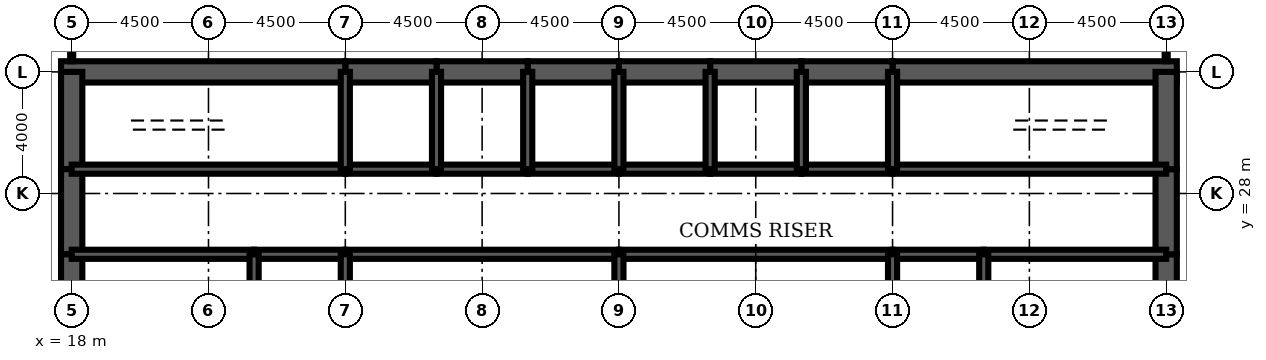
"""IFC4 building model, lengths in metres.
Left out: names, types, materials, properties, quantities, classifications, styles, units other than length and angle.
Written with IfcOpenShell. Run it as: python <this file> out.ifc"""

import sys

from ifc_helpers import new_model, si_unit, direction, frame, frame_2d, origin, place, context, subcontext, project, spatial, rectangle, extrude, element, fill, save


model = new_model("IFC4")
c1 = context("Model", 3, precision=1e-05, world=origin(), true_north=direction((0.0, 1.0)))
c2 = subcontext(c1, "Body", "Model", "MODEL_VIEW")
j1 = project(units=[si_unit("LENGTHUNIT", "METRE"), si_unit("PLANEANGLEUNIT", "RADIAN")], contexts=[c1])
p1 = place(None, origin())
s1 = spatial("IfcSite", under=j1, at=p1, CompositionType="ELEMENT")
p2 = place(p1, origin())
s2 = spatial("IfcBuilding", under=s1, at=p2, CompositionType="ELEMENT")
p3 = place(p2, frame((0.0, 0.0, 321.5)))
s3 = spatial("IfcBuildingStorey", under=s2, at=p3, CompositionType="ELEMENT", Elevation=321.5)
p4 = place(p3, frame((54.35, 32.0, 0.0), z_axis=(0.0, 0.0, 1.0), x_axis=(-1.0, 0.0, 0.0)))
e1 = element("IfcWall", 1, at=p4, inside=s3, PredefinedType="SHEAR", context=c2, shape_type="SweptSolid", body=[
    extrude(rectangle(XDim=9.35, YDim=0.7, at=frame_2d((4.675, 0.0))), origin(), (0.0, 0.0, 1.0), 4.2),
])
for number, where, z_axis, x_axis in (
    (2, (45.0, 32.0, 0.0), (0.0, 0.0, 1.0), (-1.0, 0.0, 0.0)),
    (3, (42.0, 32.0, 0.0), (0.0, 0.0, 1.0), (-1.0, 0.0, 0.0)),
    (4, (39.0, 32.0, 0.0), (0.0, 0.0, 1.0), (-1.0, 0.0, 0.0)),
    (5, (36.0, 32.0, 0.0), (0.0, 0.0, 1.0), (-1.0, 0.0, 0.0)),
    (6, (33.0, 32.0, 0.0), (0.0, 0.0, 1.0), (-1.0, 0.0, 0.0)),
    (7, (30.0, 32.0, 0.0), (0.0, 0.0, 1.0), (-1.0, 0.0, 0.0)),
):
    element("IfcWall", number, at=place(p3, frame(where, z_axis=z_axis, x_axis=x_axis)), inside=s3, PredefinedType="SHEAR", context=c2, shape_type="SweptSolid", body=[
        extrude(rectangle(XDim=3.0, YDim=0.7, at=frame_2d((1.5, 0.0))), origin(), (0.0, 0.0, 1.0), 4.2),
    ])
p5 = place(p3, frame((27.0, 32.0, 0.0), z_axis=(0.0, 0.0, 1.0), x_axis=(-1.0, 0.0, 0.0)))
e8 = element("IfcWall", 8, at=p5, inside=s3, PredefinedType="SHEAR", context=c2, shape_type="SweptSolid", body=[
    extrude(rectangle(XDim=9.35, YDim=0.7, at=frame_2d((4.675, 0.0))), origin(), (0.0, 0.0, 1.0), 4.2),
])
p6 = place(p3, frame((18.0, 32.0, 0.0), z_axis=(0.0, 0.0, 1.0), x_axis=(0.0, -1.0, 0.0)))
e9 = element("IfcWall", 9, at=p6, inside=s3, PredefinedType="SHEAR", context=c2, shape_type="SweptSolid", body=[
    extrude(rectangle(XDim=3.2, YDim=0.7, at=frame_2d((1.6, 0.0))), origin(), (0.0, 0.0, 1.0), 4.2),
])
p7 = place(p3, frame((18.0, 28.8, 0.0), z_axis=(0.0, 0.0, 1.0), x_axis=(0.0, -1.0, 0.0)))
e10 = element("IfcWall", 10, at=p7, inside=s3, PredefinedType="SHEAR", context=c2, shape_type="SweptSolid", body=[
    extrude(rectangle(XDim=2.8, YDim=0.7, at=frame_2d((1.4, 0.0))), origin(), (0.0, 0.0, 1.0), 4.2),
])
p8 = place(p7, frame((0.4, 0.0, 0.0)))
e11 = element("IfcOpeningElement", 11, at=p8, cuts=e10, PredefinedType="OPENING", context=c2, shape_type="SweptSolid", body=[
    extrude(rectangle(XDim=1.8, YDim=2.1, at=frame_2d((0.9, 1.05))), frame((0.0, 0.36, 0.0), z_axis=(0.0, -1.0, 0.0), x_axis=(1.0, 0.0, 0.0)), (0.0, 0.0, 1.0), 0.72),
])
for number, where, z_axis, x_axis in (
    (12, (18.0, 26.0, 0.0), (0.0, 0.0, 1.0), (0.0, -1.0, 0.0)),
    (13, (54.0, 22.0, 0.0), (0.0, 0.0, 1.0), (0.0, 1.0, 0.0)),
):
    element("IfcWall", number, at=place(p3, frame(where, z_axis=z_axis, x_axis=x_axis)), inside=s3, PredefinedType="SHEAR", context=c2, shape_type="SweptSolid", body=[
        extrude(rectangle(XDim=4.0, YDim=0.7, at=frame_2d((2.0, 0.0))), origin(), (0.0, 0.0, 1.0), 4.2),
    ])
p9 = place(p3, frame((54.0, 26.0, 0.0), z_axis=(0.0, 0.0, 1.0), x_axis=(0.0, 1.0, 0.0)))
e14 = element("IfcWall", 14, at=p9, inside=s3, PredefinedType="SHEAR", context=c2, shape_type="SweptSolid", body=[
    extrude(rectangle(XDim=2.8, YDim=0.7, at=frame_2d((1.4, 0.0))), origin(), (0.0, 0.0, 1.0), 4.2),
])
p10 = place(p9, frame((0.6, 0.0, 0.0)))
e15 = element("IfcOpeningElement", 15, at=p10, cuts=e14, PredefinedType="OPENING", context=c2, shape_type="SweptSolid", body=[
    extrude(rectangle(XDim=1.8, YDim=2.1, at=frame_2d((0.9, 1.05))), frame((0.0, 0.36, 0.0), z_axis=(0.0, -1.0, 0.0), x_axis=(1.0, 0.0, 0.0)), (0.0, 0.0, 1.0), 0.72),
])
p11 = place(p3, frame((54.0, 28.8, 0.0), z_axis=(0.0, 0.0, 1.0), x_axis=(0.0, 1.0, 0.0)))
e16 = element("IfcWall", 16, at=p11, inside=s3, PredefinedType="SHEAR", context=c2, shape_type="SweptSolid", body=[
    extrude(rectangle(XDim=3.2, YDim=0.7, at=frame_2d((1.6, 0.0))), origin(), (0.0, 0.0, 1.0), 4.2),
])
p12 = place(p3, frame((18.0, 28.8, 0.0), z_axis=(0.0, 0.0, 1.0), x_axis=(1.0, 0.0, 0.0)))
e17 = element("IfcWall", 17, at=p12, inside=s3, PredefinedType="SOLIDWALL", context=c2, shape_type="SweptSolid", body=[
    extrude(rectangle(XDim=9.0, YDim=0.3, at=frame_2d((4.5, 0.0))), origin(), (0.0, 0.0, 1.0), 4.2),
])
p13 = place(p12, frame((0.65, 0.0, 0.0)))
e18 = element("IfcOpeningElement", 18, at=p13, cuts=e17, PredefinedType="OPENING", context=c2, shape_type="SweptSolid", body=[
    extrude(rectangle(XDim=1.0, YDim=2.1, at=frame_2d((0.5, 1.05))), frame((0.0, 0.16, 0.0), z_axis=(0.0, -1.0, 0.0), x_axis=(1.0, 0.0, 0.0)), (0.0, 0.0, 1.0), 0.32),
])
p14 = place(p3, frame((27.0, 28.8, 0.0), z_axis=(0.0, 0.0, 1.0), x_axis=(1.0, 0.0, 0.0)))
e19 = element("IfcWall", 19, at=p14, inside=s3, PredefinedType="SOLIDWALL", context=c2, shape_type="SweptSolid", body=[
    extrude(rectangle(XDim=3.0, YDim=0.3, at=frame_2d((1.5, 0.0))), origin(), (0.0, 0.0, 1.0), 4.2),
])
p15 = place(p14, frame((0.95, 0.0, 0.0)))
e20 = element("IfcOpeningElement", 20, at=p15, cuts=e19, PredefinedType="OPENING", context=c2, shape_type="SweptSolid", body=[
    extrude(rectangle(XDim=1.1, YDim=2.2, at=frame_2d((0.55, 1.1))), frame((0.0, 0.16, 0.0), z_axis=(0.0, -1.0, 0.0), x_axis=(1.0, 0.0, 0.0)), (0.0, 0.0, 1.0), 0.32),
])
p16 = place(p3, frame((30.0, 28.8, 0.0), z_axis=(0.0, 0.0, 1.0), x_axis=(1.0, 0.0, 0.0)))
e21 = element("IfcWall", 21, at=p16, inside=s3, PredefinedType="SOLIDWALL", context=c2, shape_type="SweptSolid", body=[
    extrude(rectangle(XDim=3.0, YDim=0.3, at=frame_2d((1.5, 0.0))), origin(), (0.0, 0.0, 1.0), 4.2),
])
p17 = place(p16, frame((0.95, 0.0, 0.0)))
e22 = element("IfcOpeningElement", 22, at=p17, cuts=e21, PredefinedType="OPENING", context=c2, shape_type="SweptSolid", body=[
    extrude(rectangle(XDim=1.1, YDim=2.2, at=frame_2d((0.55, 1.1))), frame((0.0, 0.16, 0.0), z_axis=(0.0, -1.0, 0.0), x_axis=(1.0, 0.0, 0.0)), (0.0, 0.0, 1.0), 0.32),
])
p18 = place(p3, frame((33.0, 28.8, 0.0), z_axis=(0.0, 0.0, 1.0), x_axis=(1.0, 0.0, 0.0)))
e23 = element("IfcWall", 23, at=p18, inside=s3, PredefinedType="SOLIDWALL", context=c2, shape_type="SweptSolid", body=[
    extrude(rectangle(XDim=3.0, YDim=0.3, at=frame_2d((1.5, 0.0))), origin(), (0.0, 0.0, 1.0), 4.2),
])
p19 = place(p18, frame((0.95, 0.0, 0.0)))
e24 = element("IfcOpeningElement", 24, at=p19, cuts=e23, PredefinedType="OPENING", context=c2, shape_type="SweptSolid", body=[
    extrude(rectangle(XDim=1.1, YDim=2.2, at=frame_2d((0.55, 1.1))), frame((0.0, 0.16, 0.0), z_axis=(0.0, -1.0, 0.0), x_axis=(1.0, 0.0, 0.0)), (0.0, 0.0, 1.0), 0.32),
])
p20 = place(p3, frame((36.0, 28.8, 0.0), z_axis=(0.0, 0.0, 1.0), x_axis=(1.0, 0.0, 0.0)))
e25 = element("IfcWall", 25, at=p20, inside=s3, PredefinedType="SOLIDWALL", context=c2, shape_type="SweptSolid", body=[
    extrude(rectangle(XDim=3.0, YDim=0.3, at=frame_2d((1.5, 0.0))), origin(), (0.0, 0.0, 1.0), 4.2),
])
p21 = place(p20, frame((1.0, 0.0, 0.0)))
e26 = element("IfcOpeningElement", 26, at=p21, cuts=e25, PredefinedType="OPENING", context=c2, shape_type="SweptSolid", body=[
    extrude(rectangle(XDim=1.0, YDim=2.1, at=frame_2d((0.5, 1.05))), frame((0.0, 0.16, 0.0), z_axis=(0.0, -1.0, 0.0), x_axis=(1.0, 0.0, 0.0)), (0.0, 0.0, 1.0), 0.32),
])
p22 = place(p3, frame((39.0, 28.8, 0.0), z_axis=(0.0, 0.0, 1.0), x_axis=(1.0, 0.0, 0.0)))
e27 = element("IfcWall", 27, at=p22, inside=s3, PredefinedType="SOLIDWALL", context=c2, shape_type="SweptSolid", body=[
    extrude(rectangle(XDim=3.0, YDim=0.3, at=frame_2d((1.5, 0.0))), origin(), (0.0, 0.0, 1.0), 4.2),
])
p23 = place(p22, frame((1.0, 0.0, 0.0)))
e28 = element("IfcOpeningElement", 28, at=p23, cuts=e27, PredefinedType="OPENING", context=c2, shape_type="SweptSolid", body=[
    extrude(rectangle(XDim=1.0, YDim=2.1, at=frame_2d((0.5, 1.05))), frame((0.0, 0.16, 0.0), z_axis=(0.0, -1.0, 0.0), x_axis=(1.0, 0.0, 0.0)), (0.0, 0.0, 1.0), 0.32),
])
p24 = place(p3, frame((42.0, 28.8, 0.0), z_axis=(0.0, 0.0, 1.0), x_axis=(1.0, 0.0, 0.0)))
e29 = element("IfcWall", 29, at=p24, inside=s3, PredefinedType="SOLIDWALL", context=c2, shape_type="SweptSolid", body=[
    extrude(rectangle(XDim=3.0, YDim=0.3, at=frame_2d((1.5, 0.0))), origin(), (0.0, 0.0, 1.0), 4.2),
])
p25 = place(p24, frame((0.95, 0.0, 0.0)))
e30 = element("IfcOpeningElement", 30, at=p25, cuts=e29, PredefinedType="OPENING", context=c2, shape_type="SweptSolid", body=[
    extrude(rectangle(XDim=1.1, YDim=2.2, at=frame_2d((0.55, 1.1))), frame((0.0, 0.16, 0.0), z_axis=(0.0, -1.0, 0.0), x_axis=(1.0, 0.0, 0.0)), (0.0, 0.0, 1.0), 0.32),
])
p26 = place(p3, frame((45.0, 28.8, 0.0), z_axis=(0.0, 0.0, 1.0), x_axis=(1.0, 0.0, 0.0)))
e31 = element("IfcWall", 31, at=p26, inside=s3, PredefinedType="SOLIDWALL", context=c2, shape_type="SweptSolid", body=[
    extrude(rectangle(XDim=9.0, YDim=0.3, at=frame_2d((4.5, 0.0))), origin(), (0.0, 0.0, 1.0), 4.2),
])
p27 = place(p26, frame((7.35, 0.0, 0.0)))
e32 = element("IfcOpeningElement", 32, at=p27, cuts=e31, PredefinedType="OPENING", context=c2, shape_type="SweptSolid", body=[
    extrude(rectangle(XDim=1.0, YDim=2.1, at=frame_2d((0.5, 1.05))), frame((0.0, 0.16, 0.0), z_axis=(0.0, -1.0, 0.0), x_axis=(1.0, 0.0, 0.0)), (0.0, 0.0, 1.0), 0.32),
])
p28 = place(p3, frame((18.0, 26.0, 0.0), z_axis=(0.0, 0.0, 1.0), x_axis=(1.0, 0.0, 0.0)))
e33 = element("IfcWall", 33, at=p28, inside=s3, PredefinedType="SOLIDWALL", context=c2, shape_type="SweptSolid", body=[
    extrude(rectangle(XDim=6.0, YDim=0.3, at=frame_2d((3.0, 0.0))), origin(), (0.0, 0.0, 1.0), 4.2),
])
p29 = place(p3, frame((24.0, 26.0, 0.0), z_axis=(0.0, 0.0, 1.0), x_axis=(1.0, 0.0, 0.0)))
e34 = element("IfcWall", 34, at=p29, inside=s3, PredefinedType="SOLIDWALL", context=c2, shape_type="SweptSolid", body=[
    extrude(rectangle(XDim=3.0, YDim=0.3, at=frame_2d((1.5, 0.0))), origin(), (0.0, 0.0, 1.0), 4.2),
])
for number, where, z_axis, x_axis in (
    (35, (27.0, 26.0, 0.0), (0.0, 0.0, 1.0), (1.0, 0.0, 0.0)),
    (36, (36.0, 26.0, 0.0), (0.0, 0.0, 1.0), (1.0, 0.0, 0.0)),
):
    element("IfcWall", number, at=place(p3, frame(where, z_axis=z_axis, x_axis=x_axis)), inside=s3, PredefinedType="SOLIDWALL", context=c2, shape_type="SweptSolid", body=[
        extrude(rectangle(XDim=9.0, YDim=0.3, at=frame_2d((4.5, 0.0))), origin(), (0.0, 0.0, 1.0), 4.2),
    ])
p30 = place(p3, frame((45.0, 26.0, 0.0), z_axis=(0.0, 0.0, 1.0), x_axis=(1.0, 0.0, 0.0)))
e37 = element("IfcWall", 37, at=p30, inside=s3, PredefinedType="SOLIDWALL", context=c2, shape_type="SweptSolid", body=[
    extrude(rectangle(XDim=3.0, YDim=0.3, at=frame_2d((1.5, 0.0))), origin(), (0.0, 0.0, 1.0), 4.2),
])
p31 = place(p3, frame((48.0, 26.0, 0.0), z_axis=(0.0, 0.0, 1.0), x_axis=(1.0, 0.0, 0.0)))
e38 = element("IfcWall", 38, at=p31, inside=s3, PredefinedType="SOLIDWALL", context=c2, shape_type="SweptSolid", body=[
    extrude(rectangle(XDim=6.0, YDim=0.3, at=frame_2d((3.0, 0.0))), origin(), (0.0, 0.0, 1.0), 4.2),
])
for number, where, z_axis, x_axis in (
    (39, (27.0, 28.8, 0.0), (0.0, 0.0, 1.0), (0.0, 1.0, 0.0)),
    (40, (30.0, 28.8, 0.0), (0.0, 0.0, 1.0), (0.0, 1.0, 0.0)),
    (41, (33.0, 28.8, 0.0), (0.0, 0.0, 1.0), (0.0, 1.0, 0.0)),
    (42, (36.0, 28.8, 0.0), (0.0, 0.0, 1.0), (0.0, 1.0, 0.0)),
    (43, (39.0, 28.8, 0.0), (0.0, 0.0, 1.0), (0.0, 1.0, 0.0)),
    (44, (42.0, 28.8, 0.0), (0.0, 0.0, 1.0), (0.0, 1.0, 0.0)),
    (45, (45.0, 28.8, 0.0), (0.0, 0.0, 1.0), (0.0, 1.0, 0.0)),
):
    element("IfcWall", number, at=place(p3, frame(where, z_axis=z_axis, x_axis=x_axis)), inside=s3, PredefinedType="SOLIDWALL", context=c2, shape_type="SweptSolid", body=[
        extrude(rectangle(XDim=3.2, YDim=0.3, at=frame_2d((1.6, 0.0))), origin(), (0.0, 0.0, 1.0), 4.2),
    ])
for number, where, z_axis, x_axis in (
    (46, (24.0, 22.0, 0.0), (0.0, 0.0, 1.0), (0.0, 1.0, 0.0)),
    (47, (27.0, 22.0, 0.0), (0.0, 0.0, 1.0), (0.0, 1.0, 0.0)),
    (48, (36.0, 22.0, 0.0), (0.0, 0.0, 1.0), (0.0, 1.0, 0.0)),
    (49, (45.0, 22.0, 0.0), (0.0, 0.0, 1.0), (0.0, 1.0, 0.0)),
    (50, (48.0, 22.0, 0.0), (0.0, 0.0, 1.0), (0.0, 1.0, 0.0)),
):
    element("IfcWall", number, at=place(p3, frame(where, z_axis=z_axis, x_axis=x_axis)), inside=s3, PredefinedType="SOLIDWALL", context=c2, shape_type="SweptSolid", body=[
        extrude(rectangle(XDim=4.0, YDim=0.3, at=frame_2d((2.0, 0.0))), origin(), (0.0, 0.0, 1.0), 4.2),
    ])
p32 = place(p3, frame((38.5, 22.15, 0.0), z_axis=(0.0, 0.0, 1.0), x_axis=(0.0, 1.0, 0.0)))
e51 = element("IfcWall", 51, at=p32, inside=s3, PredefinedType="PARTITIONING", context=c2, shape_type="SweptSolid", body=[
    extrude(rectangle(XDim=3.7, YDim=0.15, at=frame_2d((1.85, 0.0))), origin(), (0.0, 0.0, 1.0), 3.0),
])
p33 = place(p32, frame((2.2, 0.0, 0.0)))
e52 = element("IfcOpeningElement", 52, at=p33, cuts=e51, PredefinedType="OPENING", context=c2, shape_type="SweptSolid", body=[
    extrude(rectangle(XDim=1.0, YDim=2.1, at=frame_2d((0.5, 1.05))), frame((0.0, 0.085, 0.0), z_axis=(0.0, -1.0, 0.0), x_axis=(1.0, 0.0, 0.0)), (0.0, 0.0, 1.0), 0.17),
])
p34 = place(p3, frame((51.475, 22.15, 0.0), z_axis=(0.0, 0.0, 1.0), x_axis=(0.0, 1.0, 0.0)))
e53 = element("IfcWall", 53, at=p34, inside=s3, PredefinedType="PARTITIONING", context=c2, shape_type="SweptSolid", body=[
    extrude(rectangle(XDim=3.7, YDim=0.15, at=frame_2d((1.85, 0.0))), origin(), (0.0, 0.0, 1.0), 3.0),
])
p35 = place(p3, frame((49.2, 26.15, 0.0), z_axis=(0.0, 0.0, 1.0), x_axis=(0.0, 1.0, 0.0)))
e54 = element("IfcWall", 54, at=p35, inside=s3, PredefinedType="PARTITIONING", context=c2, shape_type="SweptSolid", body=[
    extrude(rectangle(XDim=2.5, YDim=0.15, at=frame_2d((1.25, 0.0))), origin(), (0.0, 0.0, 1.0), 3.0),
])
p36 = place(p35, frame((1.15, 0.0, 0.0)))
e55 = element("IfcOpeningElement", 55, at=p36, cuts=e54, PredefinedType="OPENING", context=c2, shape_type="SweptSolid", body=[
    extrude(rectangle(XDim=1.0, YDim=2.1, at=frame_2d((0.5, 1.05))), frame((0.0, 0.085, 0.0), z_axis=(0.0, -1.0, 0.0), x_axis=(1.0, 0.0, 0.0)), (0.0, 0.0, 1.0), 0.17),
])
p37 = place(p3, frame((18.0, 32.35, 0.0), z_axis=(0.0, 0.0, 1.0), x_axis=(0.0, 1.0, 0.0)))
e56 = element("IfcWall", 56, at=p37, inside=s3, PredefinedType="PARTITIONING", context=c2, shape_type="SweptSolid", body=[
    extrude(rectangle(XDim=6.7, YDim=0.1, at=frame_2d((3.35, 0.0))), origin(), (0.0, 0.0, 1.0), 3.0),
])
p38 = place(p37, frame((2.55, 0.0, 0.0)))
e57 = element("IfcOpeningElement", 57, at=p38, cuts=e56, PredefinedType="OPENING", context=c2, shape_type="SweptSolid", body=[
    extrude(rectangle(XDim=1.6, YDim=2.1, at=frame_2d((0.8, 1.05))), frame((0.0, 0.06, 0.0), z_axis=(0.0, -1.0, 0.0), x_axis=(1.0, 0.0, 0.0)), (0.0, 0.0, 1.0), 0.12),
])
p39 = place(p3, frame((54.0, 32.35, 0.0), z_axis=(0.0, 0.0, 1.0), x_axis=(0.0, 1.0, 0.0)))
e58 = element("IfcWall", 58, at=p39, inside=s3, PredefinedType="PARTITIONING", context=c2, shape_type="SweptSolid", body=[
    extrude(rectangle(XDim=11.2, YDim=0.1, at=frame_2d((5.6, 0.0))), origin(), (0.0, 0.0, 1.0), 3.0),
])
p40 = place(p39, frame((2.3, 0.0, 0.0)))
e59 = element("IfcOpeningElement", 59, at=p40, cuts=e58, PredefinedType="OPENING", context=c2, shape_type="SweptSolid", body=[
    extrude(rectangle(XDim=1.6, YDim=2.1, at=frame_2d((0.8, 1.05))), frame((0.0, 0.06, 0.0), z_axis=(0.0, -1.0, 0.0), x_axis=(1.0, 0.0, 0.0)), (0.0, 0.0, 1.0), 0.12),
])
p41 = place(p33, origin())
e60 = element("IfcDoor", 60, at=p41, inside=s3, OperationType="SINGLE_SWING_RIGHT", PredefinedType="DOOR", context=c2, shape_type="SweptSolid", body=[
    extrude(rectangle(XDim=1.0, YDim=2.1, at=frame_2d((0.5, 1.05))), frame((0.0, 0.025, 0.0), z_axis=(0.0, -1.0, 0.0), x_axis=(1.0, 0.0, 0.0)), (0.0, 0.0, 1.0), 0.05),
])
fill(e52, e60)
p42 = place(p36, origin())
e61 = element("IfcDoor", 61, at=p42, inside=s3, OperationType="SINGLE_SWING_RIGHT", PredefinedType="DOOR", context=c2, shape_type="SweptSolid", body=[
    extrude(rectangle(XDim=1.0, YDim=2.1, at=frame_2d((0.5, 1.05))), frame((0.0, 0.025, 0.0), z_axis=(0.0, -1.0, 0.0), x_axis=(1.0, 0.0, 0.0)), (0.0, 0.0, 1.0), 0.05),
])
fill(e55, e61)
p43 = place(p25, origin())
e62 = element("IfcDoor", 62, at=p43, inside=s3, OperationType="DOUBLE_DOOR_SLIDING", PredefinedType="USERDEFINED", context=c2, shape_type="SweptSolid", body=[
    extrude(rectangle(XDim=1.1, YDim=2.2, at=frame_2d((0.55, 1.1))), frame((0.0, 0.025, 0.0), z_axis=(0.0, -1.0, 0.0), x_axis=(1.0, 0.0, 0.0)), (0.0, 0.0, 1.0), 0.05),
])
fill(e30, e62)
p44 = place(p15, origin())
e63 = element("IfcDoor", 63, at=p44, inside=s3, OperationType="DOUBLE_DOOR_SLIDING", PredefinedType="USERDEFINED", context=c2, shape_type="SweptSolid", body=[
    extrude(rectangle(XDim=1.1, YDim=2.2, at=frame_2d((0.55, 1.1))), frame((0.0, 0.025, 0.0), z_axis=(0.0, -1.0, 0.0), x_axis=(1.0, 0.0, 0.0)), (0.0, 0.0, 1.0), 0.05),
])
fill(e20, e63)
p45 = place(p17, origin())
e64 = element("IfcDoor", 64, at=p45, inside=s3, OperationType="DOUBLE_DOOR_SLIDING", PredefinedType="USERDEFINED", context=c2, shape_type="SweptSolid", body=[
    extrude(rectangle(XDim=1.1, YDim=2.2, at=frame_2d((0.55, 1.1))), frame((0.0, 0.025, 0.0), z_axis=(0.0, -1.0, 0.0), x_axis=(1.0, 0.0, 0.0)), (0.0, 0.0, 1.0), 0.05),
])
fill(e22, e64)
p46 = place(p19, origin())
e65 = element("IfcDoor", 65, at=p46, inside=s3, OperationType="DOUBLE_DOOR_SLIDING", PredefinedType="USERDEFINED", context=c2, shape_type="SweptSolid", body=[
    extrude(rectangle(XDim=1.1, YDim=2.2, at=frame_2d((0.55, 1.1))), frame((0.0, 0.025, 0.0), z_axis=(0.0, -1.0, 0.0), x_axis=(1.0, 0.0, 0.0)), (0.0, 0.0, 1.0), 0.05),
])
fill(e24, e65)
p47 = place(p13, origin())
e66 = element("IfcDoor", 66, at=p47, inside=s3, OperationType="SINGLE_SWING_LEFT", PredefinedType="DOOR", context=c2, shape_type="SweptSolid", body=[
    extrude(rectangle(XDim=1.0, YDim=2.1, at=frame_2d((0.5, 1.05))), frame((0.0, 0.025, 0.0), z_axis=(0.0, -1.0, 0.0), x_axis=(1.0, 0.0, 0.0)), (0.0, 0.0, 1.0), 0.05),
])
fill(e18, e66)
p48 = place(p27, origin())
e67 = element("IfcDoor", 67, at=p48, inside=s3, OperationType="SINGLE_SWING_RIGHT", PredefinedType="DOOR", context=c2, shape_type="SweptSolid", body=[
    extrude(rectangle(XDim=1.0, YDim=2.1, at=frame_2d((0.5, 1.05))), frame((0.0, 0.025, 0.0), z_axis=(0.0, -1.0, 0.0), x_axis=(1.0, 0.0, 0.0)), (0.0, 0.0, 1.0), 0.05),
])
fill(e32, e67)
p49 = place(p8, origin())
e68 = element("IfcDoor", 68, at=p49, inside=s3, OperationType="SINGLE_SWING_LEFT", PredefinedType="DOOR", context=c2, shape_type="SweptSolid", body=[
    extrude(rectangle(XDim=1.8, YDim=2.1, at=frame_2d((0.9, 1.05))), frame((0.0, 0.35, 0.0), z_axis=(0.0, -1.0, 0.0), x_axis=(1.0, 0.0, 0.0)), (0.0, 0.0, 1.0), 0.699),
])
fill(e11, e68)
p50 = place(p10, origin())
e69 = element("IfcDoor", 69, at=p50, inside=s3, OperationType="SINGLE_SWING_LEFT", PredefinedType="DOOR", context=c2, shape_type="SweptSolid", body=[
    extrude(rectangle(XDim=1.8, YDim=2.1, at=frame_2d((0.9, 1.05))), frame((0.0, 0.35, 0.0), z_axis=(0.0, -1.0, 0.0), x_axis=(1.0, 0.0, 0.0)), (0.0, 0.0, 1.0), 0.699),
])
fill(e15, e69)
p51 = place(p21, origin())
e70 = element("IfcDoor", 70, at=p51, inside=s3, OperationType="SINGLE_SWING_LEFT", PredefinedType="DOOR", context=c2, shape_type="SweptSolid", body=[
    extrude(rectangle(XDim=1.0, YDim=2.1, at=frame_2d((0.5, 1.05))), frame((0.0, 0.025, 0.0), z_axis=(0.0, -1.0, 0.0), x_axis=(1.0, 0.0, 0.0)), (0.0, 0.0, 1.0), 0.05),
])
fill(e26, e70)
p52 = place(p23, origin())
e71 = element("IfcDoor", 71, at=p52, inside=s3, OperationType="SINGLE_SWING_LEFT", PredefinedType="DOOR", context=c2, shape_type="SweptSolid", body=[
    extrude(rectangle(XDim=1.0, YDim=2.1, at=frame_2d((0.5, 1.05))), frame((0.0, 0.025, 0.0), z_axis=(0.0, -1.0, 0.0), x_axis=(1.0, 0.0, 0.0)), (0.0, 0.0, 1.0), 0.05),
])
fill(e28, e71)
save(model, sys.argv[1])
